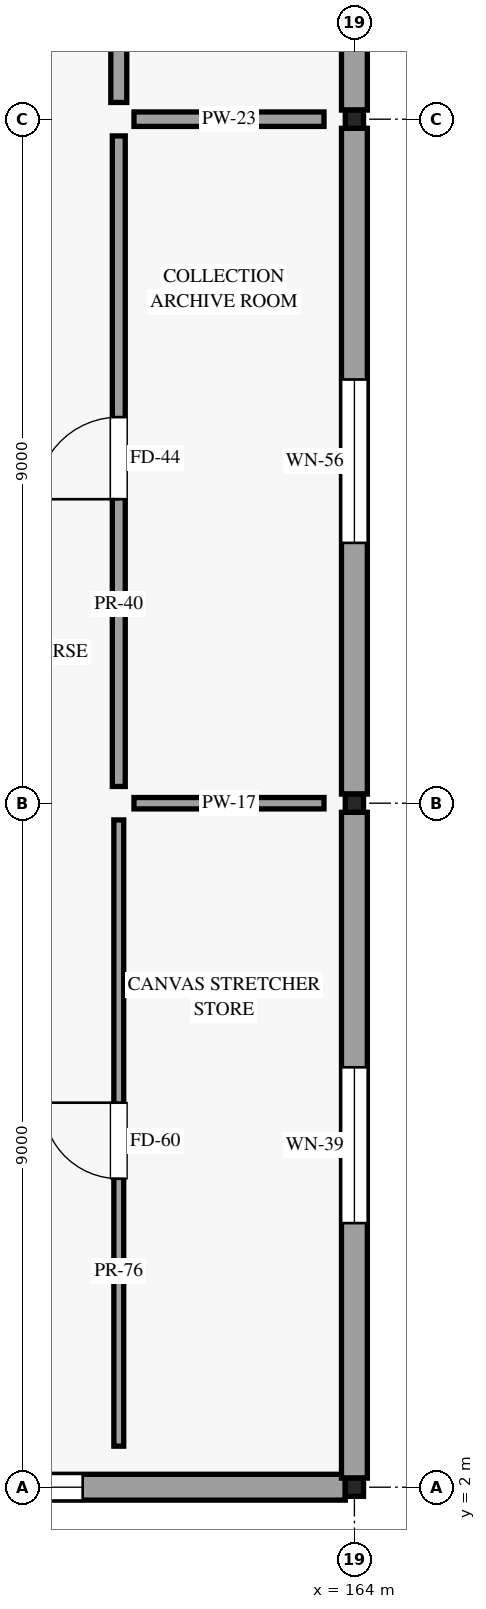
"""IFC4 building model, lengths in metres.
Left out: names, types, materials, properties, quantities, classifications, styles, units other than length and angle.
Written with IfcOpenShell. Run it as: python <this file> out.ifc"""

import sys

from ifc_helpers import new_model, si_unit, direction, frame, frame_2d, origin, origin_2d, place, context, subcontext, project, spatial, rectangle, i_section, extrude, element, fill, save


model = new_model("IFC4")
c1 = context("Model", 3, precision=1e-05, world=origin(), true_north=direction((0.0, 1.0)))
c2 = subcontext(c1, "Body", "Model", "MODEL_VIEW")
j1 = project(units=[si_unit("LENGTHUNIT", "METRE"), si_unit("PLANEANGLEUNIT", "RADIAN")], contexts=[c1])
p1 = place(None, origin())
s1 = spatial("IfcSite", under=j1, at=p1, CompositionType="ELEMENT")
p2 = place(p1, origin())
s2 = spatial("IfcBuilding", under=s1, at=p2, CompositionType="ELEMENT")
p3 = place(p2, frame((0.0, 0.0, 15.0)))
s3 = spatial("IfcBuildingStorey", under=s2, at=p3, CompositionType="ELEMENT", Elevation=15.0)
for number, where, z_axis, x_axis in (
    (1, (164.0, 2.0, 0.0), (0.0, 0.0, 1.0), (1.0, 0.0, 0.0)),
    (2, (164.0, 11.0, 0.0), (0.0, 0.0, 1.0), (1.0, 0.0, 0.0)),
    (3, (164.0, 20.0, 0.0), (0.0, 0.0, 1.0), (1.0, 0.0, 0.0)),
):
    element("IfcColumn", number, at=place(p3, frame(where, z_axis=z_axis, x_axis=x_axis)), inside=s3, PredefinedType="COLUMN", context=c2, shape_type="SweptSolid", body=[
        extrude(i_section(OverallWidth=0.24, OverallDepth=0.24, WebThickness=0.01, FlangeThickness=0.017, FilletRadius=0.021, at=origin_2d()), origin(), (0.0, 0.0, 1.0), 4.5),
    ])
p4 = place(p3, frame((155.12, 2.0, 0.0), z_axis=(0.0, 0.0, 1.0), x_axis=(1.0, 0.0, 0.0)))
e4 = element("IfcWall", 4, at=p4, inside=s3, PredefinedType="STANDARD", context=c2, shape_type="SweptSolid", body=[
    extrude(rectangle(XDim=8.76, YDim=0.34, at=frame_2d((4.38, 0.0))), origin(), (0.0, 0.0, 1.0), 3.855),
])
p5 = place(p4, frame((5.305, 0.0, 0.85), z_axis=(0.0, 0.0, 1.0), x_axis=(-1.0, 0.0, 0.0)))
e5 = element("IfcOpeningElement", 5, at=p5, cuts=e4, PredefinedType="OPENING", context=c2, shape_type="SweptSolid", body=[
    extrude(rectangle(XDim=1.85, YDim=2.1, at=frame_2d((0.925, 1.05))), frame((0.0, 0.18, 0.0), z_axis=(0.0, -1.0, 0.0), x_axis=(1.0, 0.0, 0.0)), (0.0, 0.0, 1.0), 0.36),
])
p6 = place(p3, frame((164.0, 2.12, 0.0), z_axis=(0.0, 0.0, 1.0), x_axis=(0.0, 1.0, 0.0)))
e6 = element("IfcWall", 6, at=p6, inside=s3, PredefinedType="STANDARD", context=c2, shape_type="SweptSolid", body=[
    extrude(rectangle(XDim=8.76, YDim=0.34, at=frame_2d((4.38, 0.0))), origin(), (0.0, 0.0, 1.0), 3.855),
])
p7 = place(p6, frame((5.405, 0.0, 0.85), z_axis=(0.0, 0.0, 1.0), x_axis=(-1.0, 0.0, 0.0)))
e7 = element("IfcOpeningElement", 7, at=p7, cuts=e6, PredefinedType="OPENING", context=c2, shape_type="SweptSolid", body=[
    extrude(rectangle(XDim=2.05, YDim=2.2, at=frame_2d((1.025, 1.1))), frame((0.0, 0.18, 0.0), z_axis=(0.0, -1.0, 0.0), x_axis=(1.0, 0.0, 0.0)), (0.0, 0.0, 1.0), 0.36),
])
p8 = place(p3, frame((164.0, 11.12, 0.0), z_axis=(0.0, 0.0, 1.0), x_axis=(0.0, 1.0, 0.0)))
e8 = element("IfcWall", 8, at=p8, inside=s3, PredefinedType="STANDARD", context=c2, shape_type="SweptSolid", body=[
    extrude(rectangle(XDim=8.76, YDim=0.34, at=frame_2d((4.38, 0.0))), origin(), (0.0, 0.0, 1.0), 3.855),
])
p9 = place(p8, frame((5.455, 0.0, 0.85), z_axis=(0.0, 0.0, 1.0), x_axis=(-1.0, 0.0, 0.0)))
e9 = element("IfcOpeningElement", 9, at=p9, cuts=e8, PredefinedType="OPENING", context=c2, shape_type="SweptSolid", body=[
    extrude(rectangle(XDim=2.15, YDim=2.25, at=frame_2d((1.075, 1.125))), frame((0.0, 0.18, 0.0), z_axis=(0.0, -1.0, 0.0), x_axis=(1.0, 0.0, 0.0)), (0.0, 0.0, 1.0), 0.36),
])
p10 = place(p3, frame((164.0, 20.12, 0.0), z_axis=(0.0, 0.0, 1.0), x_axis=(0.0, 1.0, 0.0)))
e10 = element("IfcWall", 10, at=p10, inside=s3, PredefinedType="STANDARD", context=c2, shape_type="SweptSolid", body=[
    extrude(rectangle(XDim=8.96, YDim=0.34, at=frame_2d((4.48, 0.0))), origin(), (0.0, 0.0, 1.0), 3.855),
])
p11 = place(p10, frame((5.655, 0.0, 0.85), z_axis=(0.0, 0.0, 1.0), x_axis=(-1.0, 0.0, 0.0)))
e11 = element("IfcOpeningElement", 11, at=p11, cuts=e10, PredefinedType="OPENING", context=c2, shape_type="SweptSolid", body=[
    extrude(rectangle(XDim=2.35, YDim=2.35, at=frame_2d((1.175, 1.175))), frame((0.0, 0.18, 0.0), z_axis=(0.0, -1.0, 0.0), x_axis=(1.0, 0.0, 0.0)), (0.0, 0.0, 1.0), 0.36),
])
p12 = place(p3, frame((160.9, 2.54, 0.0), z_axis=(0.0, 0.0, 1.0), x_axis=(0.0, 1.0, 0.0)))
e12 = element("IfcWall", 12, at=p12, inside=s3, PredefinedType="PARTITIONING", context=c2, shape_type="SweptSolid", body=[
    extrude(rectangle(XDim=8.24, YDim=0.13, at=frame_2d((4.12, 0.0))), origin(), (0.0, 0.0, 1.0), 3.855),
])
p13 = place(p12, frame((3.519, 0.0, 0.0)))
e13 = element("IfcOpeningElement", 13, at=p13, cuts=e12, PredefinedType="OPENING", context=c2, shape_type="SweptSolid", body=[
    extrude(rectangle(XDim=1.0, YDim=2.2, at=frame_2d((0.5, 1.1))), frame((0.0, 0.075, 0.0), z_axis=(0.0, -1.0, 0.0), x_axis=(1.0, 0.0, 0.0)), (0.0, 0.0, 1.0), 0.15),
])
p14 = place(p3, frame((161.1, 11.0, 0.0), z_axis=(0.0, 0.0, 1.0), x_axis=(1.0, 0.0, 0.0)))
e14 = element("IfcWall", 14, at=p14, inside=s3, PredefinedType="PARTITIONING", context=c2, shape_type="SweptSolid", body=[
    extrude(rectangle(XDim=2.5, YDim=0.15, at=frame_2d((1.25, 0.0))), origin(), (0.0, 0.0, 1.0), 3.855),
])
p15 = place(p3, frame((160.9, 11.22, 0.0), z_axis=(0.0, 0.0, 1.0), x_axis=(0.0, 1.0, 0.0)))
e15 = element("IfcWall", 15, at=p15, inside=s3, PredefinedType="PARTITIONING", context=c2, shape_type="SweptSolid", body=[
    extrude(rectangle(XDim=8.56, YDim=0.17, at=frame_2d((4.28, 0.0))), origin(), (0.0, 0.0, 1.0), 3.855),
])
p16 = place(p15, frame((3.78, 0.0, 0.0)))
e16 = element("IfcOpeningElement", 16, at=p16, cuts=e15, PredefinedType="OPENING", context=c2, shape_type="SweptSolid", body=[
    extrude(rectangle(XDim=1.08, YDim=2.24, at=frame_2d((0.54, 1.12))), frame((0.0, 0.095, 0.0), z_axis=(0.0, -1.0, 0.0), x_axis=(1.0, 0.0, 0.0)), (0.0, 0.0, 1.0), 0.19),
])
p17 = place(p3, frame((161.1, 20.0, 0.0), z_axis=(0.0, 0.0, 1.0), x_axis=(1.0, 0.0, 0.0)))
e17 = element("IfcWall", 17, at=p17, inside=s3, PredefinedType="PARTITIONING", context=c2, shape_type="SweptSolid", body=[
    extrude(rectangle(XDim=2.5, YDim=0.19, at=frame_2d((1.25, 0.0))), origin(), (0.0, 0.0, 1.0), 3.855),
])
p18 = place(p3, frame((160.9, 20.22, 0.0), z_axis=(0.0, 0.0, 1.0), x_axis=(0.0, 1.0, 0.0)))
e18 = element("IfcWall", 18, at=p18, inside=s3, PredefinedType="PARTITIONING", context=c2, shape_type="SweptSolid", body=[
    extrude(rectangle(XDim=17.96, YDim=0.21, at=frame_2d((8.98, 0.0))), origin(), (0.0, 0.0, 1.0), 3.855),
])
p19 = place(p18, frame((13.024, 0.0, 0.0)))
e19 = element("IfcOpeningElement", 19, at=p19, cuts=e18, PredefinedType="OPENING", context=c2, shape_type="SweptSolid", body=[
    extrude(rectangle(XDim=1.16, YDim=2.28, at=frame_2d((0.58, 1.14))), frame((0.0, 0.115, 0.0), z_axis=(0.0, -1.0, 0.0), x_axis=(1.0, 0.0, 0.0)), (0.0, 0.0, 1.0), 0.23),
])
p20 = place(p5, origin())
e20 = element("IfcWindow", 20, at=p20, inside=s3, PartitioningType="SINGLE_PANEL", PredefinedType="WINDOW", context=c2, shape_type="SweptSolid", body=[
    extrude(rectangle(XDim=1.85, YDim=2.1, at=frame_2d((0.925, 1.05))), frame((0.0, 0.03, 0.0), z_axis=(0.0, -1.0, 0.0), x_axis=(1.0, 0.0, 0.0)), (0.0, 0.0, 1.0), 0.06),
])
fill(e5, e20)
p21 = place(p7, origin())
e21 = element("IfcWindow", 21, at=p21, inside=s3, PartitioningType="SINGLE_PANEL", PredefinedType="WINDOW", context=c2, shape_type="SweptSolid", body=[
    extrude(rectangle(XDim=2.05, YDim=2.2, at=frame_2d((1.025, 1.1))), frame((0.0, 0.03, 0.0), z_axis=(0.0, -1.0, 0.0), x_axis=(1.0, 0.0, 0.0)), (0.0, 0.0, 1.0), 0.06),
])
fill(e7, e21)
p22 = place(p9, origin())
e22 = element("IfcWindow", 22, at=p22, inside=s3, PartitioningType="SINGLE_PANEL", PredefinedType="WINDOW", context=c2, shape_type="SweptSolid", body=[
    extrude(rectangle(XDim=2.15, YDim=2.25, at=frame_2d((1.075, 1.125))), frame((0.0, 0.03, 0.0), z_axis=(0.0, -1.0, 0.0), x_axis=(1.0, 0.0, 0.0)), (0.0, 0.0, 1.0), 0.06),
])
fill(e9, e22)
p23 = place(p13, origin())
e23 = element("IfcDoor", 23, at=p23, inside=s3, OperationType="SINGLE_SWING_RIGHT", PredefinedType="DOOR", context=c2, shape_type="SweptSolid", body=[
    extrude(rectangle(XDim=1.0, YDim=2.2, at=frame_2d((0.5, 1.1))), frame((0.0, 0.025, 0.0), z_axis=(0.0, -1.0, 0.0), x_axis=(1.0, 0.0, 0.0)), (0.0, 0.0, 1.0), 0.05),
])
fill(e13, e23)
p24 = place(p16, origin())
e24 = element("IfcDoor", 24, at=p24, inside=s3, OperationType="SINGLE_SWING_LEFT", PredefinedType="DOOR", context=c2, shape_type="SweptSolid", body=[
    extrude(rectangle(XDim=1.08, YDim=2.24, at=frame_2d((0.54, 1.12))), frame((0.0, 0.025, 0.0), z_axis=(0.0, -1.0, 0.0), x_axis=(1.0, 0.0, 0.0)), (0.0, 0.0, 1.0), 0.05),
])
fill(e16, e24)
save(model, sys.argv[1])
